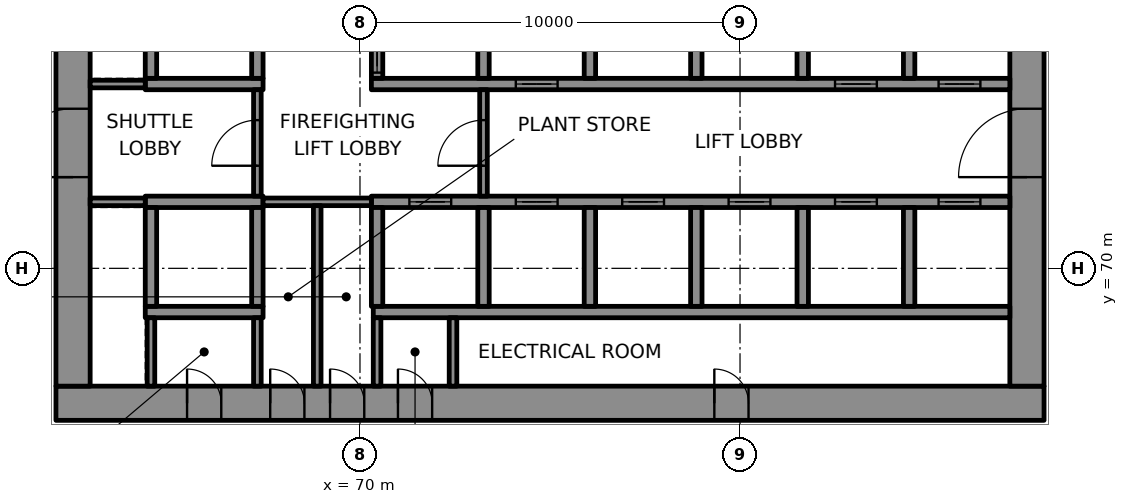
"""IFC4 building model, lengths in metres.
Left out: names, types, materials, properties, quantities, classifications, styles, units other than length and angle.
Written with IfcOpenShell. Run it as: python <this file> out.ifc"""

import sys

from ifc_helpers import new_model, si_unit, direction, frame, frame_2d, origin, place, context, subcontext, project, spatial, rectangle, extrude, element, fill, save


model = new_model("IFC4")
c1 = context("Model", 3, precision=1e-05, world=origin(), true_north=direction((0.0, 1.0)))
c2 = subcontext(c1, "Body", "Model", "MODEL_VIEW")
j1 = project(units=[si_unit("LENGTHUNIT", "METRE"), si_unit("PLANEANGLEUNIT", "RADIAN")], contexts=[c1])
p1 = place(None, origin())
s1 = spatial("IfcSite", under=j1, at=p1, CompositionType="ELEMENT")
p2 = place(p1, origin())
s2 = spatial("IfcBuilding", under=s1, at=p2, CompositionType="ELEMENT")
p3 = place(p2, frame((0.0, 0.0, 40.0)))
s3 = spatial("IfcBuildingStorey", under=s2, at=p3, CompositionType="ELEMENT", Elevation=40.0)
p4 = place(p3, frame((62.0, 66.45, 0.0), z_axis=(0.0, 0.0, 1.0), x_axis=(1.0, 0.0, 0.0)))
e1 = element("IfcWall", 1, at=p4, inside=s3, PredefinedType="SHEAR", context=c2, shape_type="SweptSolid", body=[
    extrude(rectangle(XDim=26.0, YDim=0.9, at=frame_2d((13.0, 0.0))), origin(), (0.0, 0.0, 1.0), 4.0),
])
p5 = place(p4, frame((3.45, 0.0, 0.0)))
e2 = element("IfcOpeningElement", 2, at=p5, cuts=e1, PredefinedType="OPENING", context=c2, shape_type="SweptSolid", body=[
    extrude(rectangle(XDim=0.9, YDim=2.1, at=frame_2d((0.45, 1.05))), frame((0.0, 0.46, 0.0), z_axis=(0.0, -1.0, 0.0), x_axis=(1.0, 0.0, 0.0)), (0.0, 0.0, 1.0), 0.92),
])
p6 = place(p4, frame((5.637, 0.0, 0.0)))
e3 = element("IfcOpeningElement", 3, at=p6, cuts=e1, PredefinedType="OPENING", context=c2, shape_type="SweptSolid", body=[
    extrude(rectangle(XDim=0.9, YDim=2.1, at=frame_2d((0.45, 1.05))), frame((0.0, 0.46, 0.0), z_axis=(0.0, -1.0, 0.0), x_axis=(1.0, 0.0, 0.0)), (0.0, 0.0, 1.0), 0.92),
])
p7 = place(p4, frame((7.212, 0.0, 0.0)))
e4 = element("IfcOpeningElement", 4, at=p7, cuts=e1, PredefinedType="OPENING", context=c2, shape_type="SweptSolid", body=[
    extrude(rectangle(XDim=0.9, YDim=2.1, at=frame_2d((0.45, 1.05))), frame((0.0, 0.46, 0.0), z_axis=(0.0, -1.0, 0.0), x_axis=(1.0, 0.0, 0.0)), (0.0, 0.0, 1.0), 0.92),
])
p8 = place(p4, frame((8.999, 0.0, 0.0)))
e5 = element("IfcOpeningElement", 5, at=p8, cuts=e1, PredefinedType="OPENING", context=c2, shape_type="SweptSolid", body=[
    extrude(rectangle(XDim=0.9, YDim=2.1, at=frame_2d((0.45, 1.05))), frame((0.0, 0.46, 0.0), z_axis=(0.0, -1.0, 0.0), x_axis=(1.0, 0.0, 0.0)), (0.0, 0.0, 1.0), 0.92),
])
p9 = place(p4, frame((17.324, 0.0, 0.0)))
e6 = element("IfcOpeningElement", 6, at=p9, cuts=e1, PredefinedType="OPENING", context=c2, shape_type="SweptSolid", body=[
    extrude(rectangle(XDim=0.9, YDim=2.1, at=frame_2d((0.45, 1.05))), frame((0.0, 0.46, 0.0), z_axis=(0.0, -1.0, 0.0), x_axis=(1.0, 0.0, 0.0)), (0.0, 0.0, 1.0), 0.92),
])
p10 = place(p3, frame((62.45, 66.9, 0.0), z_axis=(0.0, 0.0, 1.0), x_axis=(0.0, 1.0, 0.0)))
e7 = element("IfcWall", 7, at=p10, inside=s3, PredefinedType="SHEAR", context=c2, shape_type="SweptSolid", body=[
    extrude(rectangle(XDim=16.2, YDim=0.9, at=frame_2d((8.1, 0.0))), origin(), (0.0, 0.0, 1.0), 4.0),
])
p11 = place(p10, frame((5.5, 0.0, 0.0)))
e8 = element("IfcOpeningElement", 8, at=p11, cuts=e7, PredefinedType="OPENING", context=c2, shape_type="SweptSolid", body=[
    extrude(rectangle(XDim=1.8, YDim=2.1, at=frame_2d((0.9, 1.05))), frame((0.0, 0.46, 0.0), z_axis=(0.0, -1.0, 0.0), x_axis=(1.0, 0.0, 0.0)), (0.0, 0.0, 1.0), 0.92),
])
p12 = place(p3, frame((87.55, 66.9, 0.0), z_axis=(0.0, 0.0, 1.0), x_axis=(0.0, 1.0, 0.0)))
e9 = element("IfcWall", 9, at=p12, inside=s3, PredefinedType="SHEAR", context=c2, shape_type="SweptSolid", body=[
    extrude(rectangle(XDim=16.2, YDim=0.9, at=frame_2d((8.1, 0.0))), origin(), (0.0, 0.0, 1.0), 4.0),
])
p13 = place(p12, frame((5.5, 0.0, 0.0)))
e10 = element("IfcOpeningElement", 10, at=p13, cuts=e9, PredefinedType="OPENING", context=c2, shape_type="SweptSolid", body=[
    extrude(rectangle(XDim=1.8, YDim=2.1, at=frame_2d((0.9, 1.05))), frame((0.0, 0.46, 0.0), z_axis=(0.0, -1.0, 0.0), x_axis=(1.0, 0.0, 0.0)), (0.0, 0.0, 1.0), 0.92),
])
p14 = place(p12, frame((11.202, 0.0, 0.0)))
e11 = element("IfcOpeningElement", 11, at=p14, cuts=e9, PredefinedType="OPENING", context=c2, shape_type="SweptSolid", body=[
    extrude(rectangle(XDim=0.9, YDim=2.1, at=frame_2d((0.45, 1.05))), frame((0.0, 0.46, 0.0), z_axis=(0.0, -1.0, 0.0), x_axis=(1.0, 0.0, 0.0)), (0.0, 0.0, 1.0), 0.92),
])
p15 = place(p3, frame((64.35, 68.85, 0.0), z_axis=(0.0, 0.0, 1.0), x_axis=(1.0, 0.0, 0.0)))
e12 = element("IfcWall", 12, at=p15, inside=s3, PredefinedType="SHEAR", context=c2, shape_type="SweptSolid", body=[
    extrude(rectangle(XDim=3.1, YDim=0.3, at=frame_2d((1.55, 0.0))), origin(), (0.0, 0.0, 1.0), 4.0),
])
p16 = place(p3, frame((70.35, 68.85, 0.0), z_axis=(0.0, 0.0, 1.0), x_axis=(1.0, 0.0, 0.0)))
e13 = element("IfcWall", 13, at=p16, inside=s3, PredefinedType="SHEAR", context=c2, shape_type="SweptSolid", body=[
    extrude(rectangle(XDim=16.75, YDim=0.3, at=frame_2d((8.375, 0.0))), origin(), (0.0, 0.0, 1.0), 4.0),
])
p17 = place(p3, frame((64.35, 71.75, 0.0), z_axis=(0.0, 0.0, 1.0), x_axis=(1.0, 0.0, 0.0)))
e14 = element("IfcWall", 14, at=p17, inside=s3, PredefinedType="SHEAR", context=c2, shape_type="SweptSolid", body=[
    extrude(rectangle(XDim=3.1, YDim=0.3, at=frame_2d((1.55, 0.0))), origin(), (0.0, 0.0, 1.0), 4.0),
])
p18 = place(p3, frame((70.3, 71.75, 0.0), z_axis=(0.0, 0.0, 1.0), x_axis=(1.0, 0.0, 0.0)))
e15 = element("IfcWall", 15, at=p18, inside=s3, PredefinedType="SHEAR", context=c2, shape_type="SweptSolid", body=[
    extrude(rectangle(XDim=16.8, YDim=0.3, at=frame_2d((8.4, 0.0))), origin(), (0.0, 0.0, 1.0), 4.0),
])
p19 = place(p18, frame((1.0, 0.0, 0.0)))
e16 = element("IfcOpeningElement", 16, at=p19, cuts=e15, PredefinedType="OPENING", context=c2, shape_type="SweptSolid", body=[
    extrude(rectangle(XDim=1.1, YDim=2.1, at=frame_2d((0.55, 1.05))), frame((0.0, 0.16, 0.0), z_axis=(0.0, -1.0, 0.0), x_axis=(1.0, 0.0, 0.0)), (0.0, 0.0, 1.0), 0.32),
])
p20 = place(p18, frame((3.8, 0.0, 0.0)))
e17 = element("IfcOpeningElement", 17, at=p20, cuts=e15, PredefinedType="OPENING", context=c2, shape_type="SweptSolid", body=[
    extrude(rectangle(XDim=1.1, YDim=2.1, at=frame_2d((0.55, 1.05))), frame((0.0, 0.16, 0.0), z_axis=(0.0, -1.0, 0.0), x_axis=(1.0, 0.0, 0.0)), (0.0, 0.0, 1.0), 0.32),
])
p21 = place(p18, frame((6.6, 0.0, 0.0)))
e18 = element("IfcOpeningElement", 18, at=p21, cuts=e15, PredefinedType="OPENING", context=c2, shape_type="SweptSolid", body=[
    extrude(rectangle(XDim=1.1, YDim=2.1, at=frame_2d((0.55, 1.05))), frame((0.0, 0.16, 0.0), z_axis=(0.0, -1.0, 0.0), x_axis=(1.0, 0.0, 0.0)), (0.0, 0.0, 1.0), 0.32),
])
p22 = place(p18, frame((9.4, 0.0, 0.0)))
e19 = element("IfcOpeningElement", 19, at=p22, cuts=e15, PredefinedType="OPENING", context=c2, shape_type="SweptSolid", body=[
    extrude(rectangle(XDim=1.1, YDim=2.1, at=frame_2d((0.55, 1.05))), frame((0.0, 0.16, 0.0), z_axis=(0.0, -1.0, 0.0), x_axis=(1.0, 0.0, 0.0)), (0.0, 0.0, 1.0), 0.32),
])
p23 = place(p18, frame((12.2, 0.0, 0.0)))
e20 = element("IfcOpeningElement", 20, at=p23, cuts=e15, PredefinedType="OPENING", context=c2, shape_type="SweptSolid", body=[
    extrude(rectangle(XDim=1.1, YDim=2.1, at=frame_2d((0.55, 1.05))), frame((0.0, 0.16, 0.0), z_axis=(0.0, -1.0, 0.0), x_axis=(1.0, 0.0, 0.0)), (0.0, 0.0, 1.0), 0.32),
])
p24 = place(p18, frame((14.925, 0.0, 0.0)))
e21 = element("IfcOpeningElement", 21, at=p24, cuts=e15, PredefinedType="OPENING", context=c2, shape_type="SweptSolid", body=[
    extrude(rectangle(XDim=1.1, YDim=2.1, at=frame_2d((0.55, 1.05))), frame((0.0, 0.16, 0.0), z_axis=(0.0, -1.0, 0.0), x_axis=(1.0, 0.0, 0.0)), (0.0, 0.0, 1.0), 0.32),
])
p25 = place(p3, frame((64.35, 74.85, 0.0), z_axis=(0.0, 0.0, 1.0), x_axis=(1.0, 0.0, 0.0)))
e22 = element("IfcWall", 22, at=p25, inside=s3, PredefinedType="SHEAR", context=c2, shape_type="SweptSolid", body=[
    extrude(rectangle(XDim=3.1, YDim=0.3, at=frame_2d((1.55, 0.0))), origin(), (0.0, 0.0, 1.0), 4.0),
])
p26 = place(p3, frame((70.3, 74.85, 0.0), z_axis=(0.0, 0.0, 1.0), x_axis=(1.0, 0.0, 0.0)))
e23 = element("IfcWall", 23, at=p26, inside=s3, PredefinedType="SHEAR", context=c2, shape_type="SweptSolid", body=[
    extrude(rectangle(XDim=16.8, YDim=0.3, at=frame_2d((8.4, 0.0))), origin(), (0.0, 0.0, 1.0), 4.0),
])
p27 = place(p26, frame((3.8, 0.0, 0.0)))
e24 = element("IfcOpeningElement", 24, at=p27, cuts=e23, PredefinedType="OPENING", context=c2, shape_type="SweptSolid", body=[
    extrude(rectangle(XDim=1.1, YDim=2.1, at=frame_2d((0.55, 1.05))), frame((0.0, 0.16, 0.0), z_axis=(0.0, -1.0, 0.0), x_axis=(1.0, 0.0, 0.0)), (0.0, 0.0, 1.0), 0.32),
])
p28 = place(p26, frame((12.2, 0.0, 0.0)))
e25 = element("IfcOpeningElement", 25, at=p28, cuts=e23, PredefinedType="OPENING", context=c2, shape_type="SweptSolid", body=[
    extrude(rectangle(XDim=1.1, YDim=2.1, at=frame_2d((0.55, 1.05))), frame((0.0, 0.16, 0.0), z_axis=(0.0, -1.0, 0.0), x_axis=(1.0, 0.0, 0.0)), (0.0, 0.0, 1.0), 0.32),
])
p29 = place(p26, frame((14.925, 0.0, 0.0)))
e26 = element("IfcOpeningElement", 26, at=p29, cuts=e23, PredefinedType="OPENING", context=c2, shape_type="SweptSolid", body=[
    extrude(rectangle(XDim=1.1, YDim=2.1, at=frame_2d((0.55, 1.05))), frame((0.0, 0.16, 0.0), z_axis=(0.0, -1.0, 0.0), x_axis=(1.0, 0.0, 0.0)), (0.0, 0.0, 1.0), 0.32),
])
for number, where, z_axis, x_axis in (
    (27, (64.5, 69.0, 0.0), (0.0, 0.0, 1.0), (0.0, 1.0, 0.0)),
    (28, (64.5, 75.0, 0.0), (0.0, 0.0, 1.0), (0.0, 1.0, 0.0)),
    (29, (67.3, 69.0, 0.0), (0.0, 0.0, 1.0), (0.0, 1.0, 0.0)),
    (30, (67.3, 75.0, 0.0), (0.0, 0.0, 1.0), (0.0, 1.0, 0.0)),
    (31, (70.45, 69.0, 0.0), (0.0, 0.0, 1.0), (0.0, 1.0, 0.0)),
):
    element("IfcWall", number, at=place(p3, frame(where, z_axis=z_axis, x_axis=x_axis)), inside=s3, PredefinedType="SHEAR", context=c2, shape_type="SweptSolid", body=[
        extrude(rectangle(XDim=2.6, YDim=0.3, at=frame_2d((1.3, 0.0))), origin(), (0.0, 0.0, 1.0), 4.0),
    ])
p30 = place(p3, frame((70.45, 75.0, 0.0), z_axis=(0.0, 0.0, 1.0), x_axis=(0.0, 1.0, 0.0)))
e32 = element("IfcWall", 32, at=p30, inside=s3, PredefinedType="SHEAR", context=c2, shape_type="SweptSolid", body=[
    extrude(rectangle(XDim=2.6, YDim=0.3, at=frame_2d((1.3, 0.0))), origin(), (0.0, 0.0, 1.0), 4.0),
])
p31 = place(p30, frame((0.15, 0.0, 0.0)))
e33 = element("IfcOpeningElement", 33, at=p31, cuts=e32, PredefinedType="OPENING", context=c2, shape_type="SweptSolid", body=[
    extrude(rectangle(XDim=1.1, YDim=2.1, at=frame_2d((0.55, 1.05))), frame((0.0, 0.16, 0.0), z_axis=(0.0, -1.0, 0.0), x_axis=(1.0, 0.0, 0.0)), (0.0, 0.0, 1.0), 0.32),
])
for number, where, z_axis, x_axis in (
    (34, (73.25, 69.0, 0.0), (0.0, 0.0, 1.0), (0.0, 1.0, 0.0)),
    (35, (73.25, 75.0, 0.0), (0.0, 0.0, 1.0), (0.0, 1.0, 0.0)),
    (36, (76.05, 69.0, 0.0), (0.0, 0.0, 1.0), (0.0, 1.0, 0.0)),
    (37, (76.05, 75.0, 0.0), (0.0, 0.0, 1.0), (0.0, 1.0, 0.0)),
    (38, (78.85, 69.0, 0.0), (0.0, 0.0, 1.0), (0.0, 1.0, 0.0)),
    (39, (78.85, 75.0, 0.0), (0.0, 0.0, 1.0), (0.0, 1.0, 0.0)),
    (40, (81.65, 69.0, 0.0), (0.0, 0.0, 1.0), (0.0, 1.0, 0.0)),
    (41, (81.65, 75.0, 0.0), (0.0, 0.0, 1.0), (0.0, 1.0, 0.0)),
    (42, (84.45, 69.0, 0.0), (0.0, 0.0, 1.0), (0.0, 1.0, 0.0)),
    (43, (84.45, 75.0, 0.0), (0.0, 0.0, 1.0), (0.0, 1.0, 0.0)),
):
    element("IfcWall", number, at=place(p3, frame(where, z_axis=z_axis, x_axis=x_axis)), inside=s3, PredefinedType="SHEAR", context=c2, shape_type="SweptSolid", body=[
        extrude(rectangle(XDim=2.6, YDim=0.3, at=frame_2d((1.3, 0.0))), origin(), (0.0, 0.0, 1.0), 4.0),
    ])
p32 = place(p3, frame((62.9, 71.75, 0.0), z_axis=(0.0, 0.0, 1.0), x_axis=(1.0, 0.0, 0.0)))
e44 = element("IfcWall", 44, at=p32, inside=s3, PredefinedType="PARTITIONING", context=c2, shape_type="SweptSolid", body=[
    extrude(rectangle(XDim=1.45, YDim=0.2, at=frame_2d((0.725, 0.0))), origin(), (0.0, 0.0, 1.0), 4.0),
])
p33 = place(p3, frame((67.45, 71.75, 0.0), z_axis=(0.0, 0.0, 1.0), x_axis=(1.0, 0.0, 0.0)))
e45 = element("IfcWall", 45, at=p33, inside=s3, PredefinedType="PARTITIONING", context=c2, shape_type="SweptSolid", body=[
    extrude(rectangle(XDim=2.85, YDim=0.2, at=frame_2d((1.425, 0.0))), origin(), (0.0, 0.0, 1.0), 4.0),
])
p34 = place(p3, frame((62.9, 74.85, 0.0), z_axis=(0.0, 0.0, 1.0), x_axis=(1.0, 0.0, 0.0)))
e46 = element("IfcWall", 46, at=p34, inside=s3, PredefinedType="PARTITIONING", context=c2, shape_type="SweptSolid", body=[
    extrude(rectangle(XDim=1.45, YDim=0.2, at=frame_2d((0.725, 0.0))), origin(), (0.0, 0.0, 1.0), 4.0),
])
for number, where, z_axis, x_axis in (
    (47, (64.5, 66.9, 0.0), (0.0, 0.0, 1.0), (0.0, 1.0, 0.0)),
    (48, (67.3, 66.9, 0.0), (0.0, 0.0, 1.0), (0.0, 1.0, 0.0)),
):
    element("IfcWall", number, at=place(p3, frame(where, z_axis=z_axis, x_axis=x_axis)), inside=s3, PredefinedType="PARTITIONING", context=c2, shape_type="SweptSolid", body=[
        extrude(rectangle(XDim=1.8, YDim=0.2, at=frame_2d((0.9, 0.0))), origin(), (0.0, 0.0, 1.0), 4.0),
    ])
p35 = place(p3, frame((67.3, 71.9, 0.0), z_axis=(0.0, 0.0, 1.0), x_axis=(0.0, 1.0, 0.0)))
e49 = element("IfcWall", 49, at=p35, inside=s3, PredefinedType="PARTITIONING", context=c2, shape_type="SweptSolid", body=[
    extrude(rectangle(XDim=2.8, YDim=0.2, at=frame_2d((1.4, 0.0))), origin(), (0.0, 0.0, 1.0), 4.0),
])
p36 = place(p35, frame((0.8, 0.0, 0.0)))
e50 = element("IfcOpeningElement", 50, at=p36, cuts=e49, PredefinedType="OPENING", context=c2, shape_type="SweptSolid", body=[
    extrude(rectangle(XDim=1.2, YDim=2.1, at=frame_2d((0.6, 1.05))), frame((0.0, 0.11, 0.0), z_axis=(0.0, -1.0, 0.0), x_axis=(1.0, 0.0, 0.0)), (0.0, 0.0, 1.0), 0.22),
])
p37 = place(p3, frame((68.875, 66.9, 0.0), z_axis=(0.0, 0.0, 1.0), x_axis=(0.0, 1.0, 0.0)))
e51 = element("IfcWall", 51, at=p37, inside=s3, PredefinedType="PARTITIONING", context=c2, shape_type="SweptSolid", body=[
    extrude(rectangle(XDim=4.75, YDim=0.2, at=frame_2d((2.375, 0.0))), origin(), (0.0, 0.0, 1.0), 4.0),
])
for number, where, z_axis, x_axis in (
    (52, (70.45, 66.9, 0.0), (0.0, 0.0, 1.0), (0.0, 1.0, 0.0)),
    (53, (72.448, 66.9, 0.0), (0.0, 0.0, 1.0), (0.0, 1.0, 0.0)),
):
    element("IfcWall", number, at=place(p3, frame(where, z_axis=z_axis, x_axis=x_axis)), inside=s3, PredefinedType="PARTITIONING", context=c2, shape_type="SweptSolid", body=[
        extrude(rectangle(XDim=1.8, YDim=0.2, at=frame_2d((0.9, 0.0))), origin(), (0.0, 0.0, 1.0), 4.0),
    ])
p38 = place(p3, frame((73.25, 71.9, 0.0), z_axis=(0.0, 0.0, 1.0), x_axis=(0.0, 1.0, 0.0)))
e54 = element("IfcWall", 54, at=p38, inside=s3, PredefinedType="PARTITIONING", context=c2, shape_type="SweptSolid", body=[
    extrude(rectangle(XDim=2.8, YDim=0.2, at=frame_2d((1.4, 0.0))), origin(), (0.0, 0.0, 1.0), 4.0),
])
p39 = place(p38, frame((0.8, 0.0, 0.0)))
e55 = element("IfcOpeningElement", 55, at=p39, cuts=e54, PredefinedType="OPENING", context=c2, shape_type="SweptSolid", body=[
    extrude(rectangle(XDim=1.2, YDim=2.1, at=frame_2d((0.6, 1.05))), frame((0.0, 0.11, 0.0), z_axis=(0.0, -1.0, 0.0), x_axis=(1.0, 0.0, 0.0)), (0.0, 0.0, 1.0), 0.22),
])
p40 = place(p19, origin())
e56 = element("IfcDoor", 56, at=p40, inside=s3, OperationType="DOUBLE_DOOR_SLIDING", PredefinedType="DOOR", context=c2, shape_type="SweptSolid", body=[
    extrude(rectangle(XDim=1.1, YDim=2.1, at=frame_2d((0.55, 1.05))), frame((0.0, 0.025, 0.0), z_axis=(0.0, -1.0, 0.0), x_axis=(1.0, 0.0, 0.0)), (0.0, 0.0, 1.0), 0.05),
])
fill(e16, e56)
p41 = place(p20, origin())
e57 = element("IfcDoor", 57, at=p41, inside=s3, OperationType="DOUBLE_DOOR_SLIDING", PredefinedType="DOOR", context=c2, shape_type="SweptSolid", body=[
    extrude(rectangle(XDim=1.1, YDim=2.1, at=frame_2d((0.55, 1.05))), frame((0.0, 0.025, 0.0), z_axis=(0.0, -1.0, 0.0), x_axis=(1.0, 0.0, 0.0)), (0.0, 0.0, 1.0), 0.05),
])
fill(e17, e57)
p42 = place(p21, origin())
e58 = element("IfcDoor", 58, at=p42, inside=s3, OperationType="DOUBLE_DOOR_SLIDING", PredefinedType="DOOR", context=c2, shape_type="SweptSolid", body=[
    extrude(rectangle(XDim=1.1, YDim=2.1, at=frame_2d((0.55, 1.05))), frame((0.0, 0.025, 0.0), z_axis=(0.0, -1.0, 0.0), x_axis=(1.0, 0.0, 0.0)), (0.0, 0.0, 1.0), 0.05),
])
fill(e18, e58)
p43 = place(p22, origin())
e59 = element("IfcDoor", 59, at=p43, inside=s3, OperationType="DOUBLE_DOOR_SLIDING", PredefinedType="DOOR", context=c2, shape_type="SweptSolid", body=[
    extrude(rectangle(XDim=1.1, YDim=2.1, at=frame_2d((0.55, 1.05))), frame((0.0, 0.025, 0.0), z_axis=(0.0, -1.0, 0.0), x_axis=(1.0, 0.0, 0.0)), (0.0, 0.0, 1.0), 0.05),
])
fill(e19, e59)
p44 = place(p23, origin())
e60 = element("IfcDoor", 60, at=p44, inside=s3, OperationType="DOUBLE_DOOR_SLIDING", PredefinedType="DOOR", context=c2, shape_type="SweptSolid", body=[
    extrude(rectangle(XDim=1.1, YDim=2.1, at=frame_2d((0.55, 1.05))), frame((0.0, 0.025, 0.0), z_axis=(0.0, -1.0, 0.0), x_axis=(1.0, 0.0, 0.0)), (0.0, 0.0, 1.0), 0.05),
])
fill(e20, e60)
p45 = place(p24, origin())
e61 = element("IfcDoor", 61, at=p45, inside=s3, OperationType="DOUBLE_DOOR_SLIDING", PredefinedType="DOOR", context=c2, shape_type="SweptSolid", body=[
    extrude(rectangle(XDim=1.1, YDim=2.1, at=frame_2d((0.55, 1.05))), frame((0.0, 0.025, 0.0), z_axis=(0.0, -1.0, 0.0), x_axis=(1.0, 0.0, 0.0)), (0.0, 0.0, 1.0), 0.05),
])
fill(e21, e61)
p46 = place(p31, origin())
e62 = element("IfcDoor", 62, at=p46, inside=s3, OperationType="DOUBLE_DOOR_SLIDING", PredefinedType="DOOR", context=c2, shape_type="SweptSolid", body=[
    extrude(rectangle(XDim=1.1, YDim=2.1, at=frame_2d((0.55, 1.05))), frame((0.0, 0.025, 0.0), z_axis=(0.0, -1.0, 0.0), x_axis=(1.0, 0.0, 0.0)), (0.0, 0.0, 1.0), 0.05),
])
fill(e33, e62)
p47 = place(p27, origin())
e63 = element("IfcDoor", 63, at=p47, inside=s3, OperationType="DOUBLE_DOOR_SLIDING", PredefinedType="DOOR", context=c2, shape_type="SweptSolid", body=[
    extrude(rectangle(XDim=1.1, YDim=2.1, at=frame_2d((0.55, 1.05))), frame((0.0, 0.025, 0.0), z_axis=(0.0, -1.0, 0.0), x_axis=(1.0, 0.0, 0.0)), (0.0, 0.0, 1.0), 0.05),
])
fill(e24, e63)
p48 = place(p28, origin())
e64 = element("IfcDoor", 64, at=p48, inside=s3, OperationType="DOUBLE_DOOR_SLIDING", PredefinedType="DOOR", context=c2, shape_type="SweptSolid", body=[
    extrude(rectangle(XDim=1.1, YDim=2.1, at=frame_2d((0.55, 1.05))), frame((0.0, 0.025, 0.0), z_axis=(0.0, -1.0, 0.0), x_axis=(1.0, 0.0, 0.0)), (0.0, 0.0, 1.0), 0.05),
])
fill(e25, e64)
p49 = place(p29, origin())
e65 = element("IfcDoor", 65, at=p49, inside=s3, OperationType="DOUBLE_DOOR_SLIDING", PredefinedType="DOOR", context=c2, shape_type="SweptSolid", body=[
    extrude(rectangle(XDim=1.1, YDim=2.1, at=frame_2d((0.55, 1.05))), frame((0.0, 0.025, 0.0), z_axis=(0.0, -1.0, 0.0), x_axis=(1.0, 0.0, 0.0)), (0.0, 0.0, 1.0), 0.05),
])
fill(e26, e65)
p50 = place(p39, origin())
e66 = element("IfcDoor", 66, at=p50, inside=s3, OperationType="SINGLE_SWING_LEFT", PredefinedType="DOOR", context=c2, shape_type="SweptSolid", body=[
    extrude(rectangle(XDim=1.2, YDim=2.1, at=frame_2d((0.6, 1.05))), frame((0.0, 0.025, 0.0), z_axis=(0.0, -1.0, 0.0), x_axis=(1.0, 0.0, 0.0)), (0.0, 0.0, 1.0), 0.05),
])
fill(e55, e66)
p51 = place(p36, origin())
e67 = element("IfcDoor", 67, at=p51, inside=s3, OperationType="SINGLE_SWING_RIGHT", PredefinedType="DOOR", context=c2, shape_type="SweptSolid", body=[
    extrude(rectangle(XDim=1.2, YDim=2.1, at=frame_2d((0.6, 1.05))), frame((0.0, 0.025, 0.0), z_axis=(0.0, -1.0, 0.0), x_axis=(1.0, 0.0, 0.0)), (0.0, 0.0, 1.0), 0.05),
])
fill(e50, e67)
p52 = place(p11, origin())
e68 = element("IfcDoor", 68, at=p52, inside=s3, OperationType="SINGLE_SWING_LEFT", PredefinedType="DOOR", context=c2, shape_type="SweptSolid", body=[
    extrude(rectangle(XDim=1.8, YDim=2.1, at=frame_2d((0.9, 1.05))), frame((0.0, 0.17, 0.0), z_axis=(0.0, -1.0, 0.0), x_axis=(1.0, 0.0, 0.0)), (0.0, 0.0, 1.0), 0.34),
])
fill(e8, e68)
p53 = place(p13, origin())
e69 = element("IfcDoor", 69, at=p53, inside=s3, OperationType="SINGLE_SWING_RIGHT", PredefinedType="DOOR", context=c2, shape_type="SweptSolid", body=[
    extrude(rectangle(XDim=1.8, YDim=2.1, at=frame_2d((0.9, 1.05))), frame((0.0, 0.17, 0.0), z_axis=(0.0, -1.0, 0.0), x_axis=(1.0, 0.0, 0.0)), (0.0, 0.0, 1.0), 0.34),
])
fill(e10, e69)
p54 = place(p5, origin())
e70 = element("IfcDoor", 70, at=p54, inside=s3, OperationType="SINGLE_SWING_LEFT", PredefinedType="DOOR", context=c2, shape_type="SweptSolid", body=[
    extrude(rectangle(XDim=0.9, YDim=2.1, at=frame_2d((0.45, 1.05))), frame((0.0, 0.17, 0.0), z_axis=(0.0, -1.0, 0.0), x_axis=(1.0, 0.0, 0.0)), (0.0, 0.0, 1.0), 0.34),
])
fill(e2, e70)
p55 = place(p6, origin())
e71 = element("IfcDoor", 71, at=p55, inside=s3, OperationType="SINGLE_SWING_RIGHT", PredefinedType="DOOR", context=c2, shape_type="SweptSolid", body=[
    extrude(rectangle(XDim=0.9, YDim=2.1, at=frame_2d((0.45, 1.05))), frame((0.0, 0.17, 0.0), z_axis=(0.0, -1.0, 0.0), x_axis=(1.0, 0.0, 0.0)), (0.0, 0.0, 1.0), 0.34),
])
fill(e3, e71)
p56 = place(p7, origin())
e72 = element("IfcDoor", 72, at=p56, inside=s3, OperationType="SINGLE_SWING_LEFT", PredefinedType="DOOR", context=c2, shape_type="SweptSolid", body=[
    extrude(rectangle(XDim=0.9, YDim=2.1, at=frame_2d((0.45, 1.05))), frame((0.0, 0.17, 0.0), z_axis=(0.0, -1.0, 0.0), x_axis=(1.0, 0.0, 0.0)), (0.0, 0.0, 1.0), 0.34),
])
fill(e4, e72)
p57 = place(p8, origin())
e73 = element("IfcDoor", 73, at=p57, inside=s3, OperationType="SINGLE_SWING_RIGHT", PredefinedType="DOOR", context=c2, shape_type="SweptSolid", body=[
    extrude(rectangle(XDim=0.9, YDim=2.1, at=frame_2d((0.45, 1.05))), frame((0.0, 0.17, 0.0), z_axis=(0.0, -1.0, 0.0), x_axis=(1.0, 0.0, 0.0)), (0.0, 0.0, 1.0), 0.34),
])
fill(e5, e73)
p58 = place(p9, origin())
e74 = element("IfcDoor", 74, at=p58, inside=s3, OperationType="SINGLE_SWING_LEFT", PredefinedType="DOOR", context=c2, shape_type="SweptSolid", body=[
    extrude(rectangle(XDim=0.9, YDim=2.1, at=frame_2d((0.45, 1.05))), frame((0.0, 0.17, 0.0), z_axis=(0.0, -1.0, 0.0), x_axis=(1.0, 0.0, 0.0)), (0.0, 0.0, 1.0), 0.34),
])
fill(e6, e74)
save(model, sys.argv[1])
